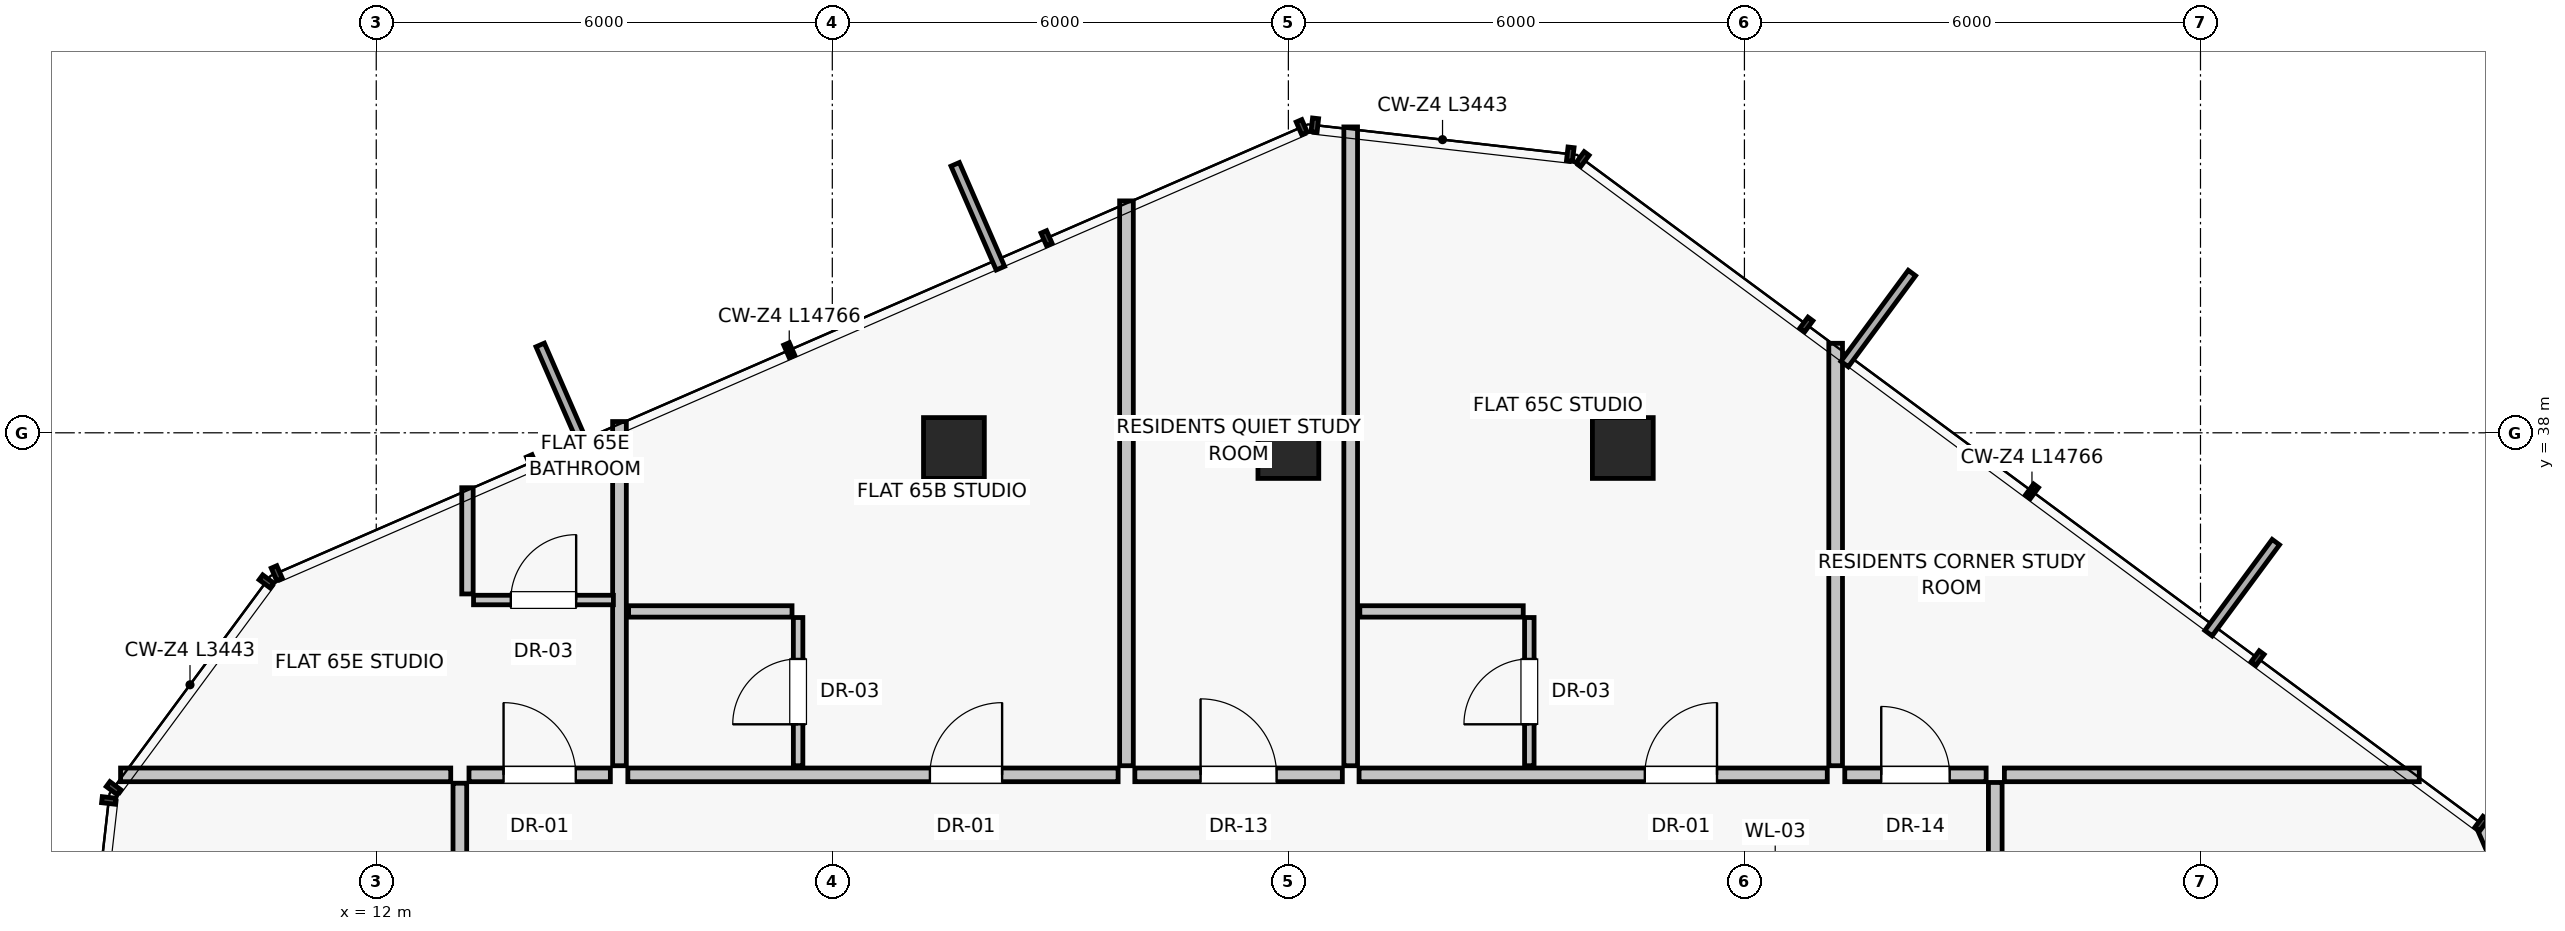
"""IFC4 building model, lengths in metres.
Left out: names, types, materials, properties, quantities, classifications, styles, units other than length and angle.
Written with IfcOpenShell. Run it as: python <this file> out.ifc"""

import sys

from ifc_helpers import new_model, si_unit, direction, frame, frame_2d, origin, origin_2d, place, context, subcontext, project, spatial, rectangle, extrude, source, transform, mapped, element, fill, save


model = new_model("IFC4")
c1 = context("Model", 3, precision=1e-05, world=origin(), true_north=direction((0.0, 1.0)))
c2 = subcontext(c1, "Body", "Model", "MODEL_VIEW")
j1 = project(units=[si_unit("LENGTHUNIT", "METRE"), si_unit("PLANEANGLEUNIT", "RADIAN")], contexts=[c1])
p1 = place(None, origin())
s1 = spatial("IfcSite", under=j1, at=p1, CompositionType="ELEMENT")
p2 = place(p1, origin())
s2 = spatial("IfcBuilding", under=s1, at=p2, CompositionType="ELEMENT")
p3 = place(p2, frame((0.0, 0.0, 230.05)))
s3 = spatial("IfcBuildingStorey", under=s2, at=p3, CompositionType="ELEMENT", Elevation=230.05)
for number, where, z_axis, x_axis in (
    (1, (28.4, 37.8, -0.235), (0.0, 0.0, 1.0), (1.0, 0.0, 0.0)),
    (2, (24.0, 37.8, -0.235), (0.0, 0.0, 1.0), (1.0, 0.0, 0.0)),
    (3, (19.6, 37.8, -0.235), (0.0, 0.0, 1.0), (1.0, 0.0, 0.0)),
):
    element("IfcColumn", number, at=place(p3, frame(where, z_axis=z_axis, x_axis=x_axis)), inside=s3, PredefinedType="COLUMN", context=c2, shape_type="SweptSolid", body=[
        extrude(rectangle(XDim=0.8, YDim=0.8, at=origin_2d()), origin(), (0.0, 0.0, 1.0), 3.485),
    ])
p4 = place(p3, frame((41.205, 29.502, 0.0), z_axis=(0.0, 0.0, 1.0), x_axis=(-0.399074107553, 0.916918675064, 0.0)))
e4 = element("IfcWall", 4, at=p4, inside=s3, PredefinedType="SOLIDWALL", context=c2, shape_type="SweptSolid", body=[
    extrude(rectangle(XDim=3.643, YDim=0.25, at=frame_2d((1.821, 0.0))), origin(), (0.0, 0.0, 1.0), 3.015),
])
p5 = place(p4, frame((0.46, 0.0, 0.0)))
e5 = element("IfcOpeningElement", 5, at=p5, cuts=e4, PredefinedType="OPENING", context=c2, shape_type="SweptSolid", body=[
    extrude(rectangle(XDim=1.15, YDim=2.25, at=frame_2d((0.575, 1.125))), frame((0.0, 0.135, 0.0), z_axis=(0.0, -1.0, 0.0), x_axis=(1.0, 0.0, 0.0)), (0.0, 0.0, 1.0), 0.27),
])
p6 = place(p3, frame((15.2, 33.62, 0.0), z_axis=(0.0, 0.0, 1.0), x_axis=(0.0, 1.0, 0.0)))
e6 = element("IfcWall", 6, at=p6, inside=s3, PredefinedType="PARTITIONING", context=c2, shape_type="SweptSolid", body=[
    extrude(rectangle(XDim=4.528, YDim=0.18, at=frame_2d((2.264, 0.0))), origin(), (0.0, 0.0, 1.0), 3.015),
])
p7 = place(p3, frame((31.2, 33.62, 0.0), z_axis=(0.0, 0.0, 1.0), x_axis=(0.0, 1.0, 0.0)))
e7 = element("IfcWall", 7, at=p7, inside=s3, PredefinedType="PARTITIONING", context=c2, shape_type="SweptSolid", body=[
    extrude(rectangle(XDim=5.558, YDim=0.18, at=frame_2d((2.779, 0.0))), origin(), (0.0, 0.0, 1.0), 3.015),
])
p8 = place(p3, frame((21.98, 33.5, 0.0), z_axis=(0.0, 0.0, 1.0), x_axis=(1.0, 0.0, 0.0)))
e8 = element("IfcWall", 8, at=p8, inside=s3, PredefinedType="PARTITIONING", context=c2, shape_type="SweptSolid", body=[
    extrude(rectangle(XDim=2.73, YDim=0.18, at=frame_2d((1.365, 0.0))), origin(), (0.0, 0.0, 1.0), 3.015),
])
p9 = place(p8, frame((0.865, 0.0, 0.0)))
e9 = element("IfcOpeningElement", 9, at=p9, cuts=e8, PredefinedType="OPENING", context=c2, shape_type="SweptSolid", body=[
    extrude(rectangle(XDim=1.0, YDim=2.01, at=frame_2d((0.5, 1.005))), frame((0.0, 0.1, 0.0), z_axis=(0.0, -1.0, 0.0), x_axis=(1.0, 0.0, 0.0)), (0.0, 0.0, 1.0), 0.2),
])
p10 = place(p3, frame((21.87, 33.62, 0.0), z_axis=(0.0, 0.0, 1.0), x_axis=(0.0, 1.0, 0.0)))
e10 = element("IfcWall", 10, at=p10, inside=s3, PredefinedType="PARTITIONING", context=c2, shape_type="SweptSolid", body=[
    extrude(rectangle(XDim=7.431, YDim=0.18, at=frame_2d((3.715, 0.0))), origin(), (0.0, 0.0, 1.0), 3.015),
])
p11 = place(p3, frame((15.31, 33.5, 0.0), z_axis=(0.0, 0.0, 1.0), x_axis=(1.0, 0.0, 0.0)))
e11 = element("IfcWall", 11, at=p11, inside=s3, PredefinedType="PARTITIONING", context=c2, shape_type="SweptSolid", body=[
    extrude(rectangle(XDim=6.45, YDim=0.18, at=frame_2d((3.225, 0.0))), origin(), (0.0, 0.0, 1.0), 3.015),
])
p12 = place(p11, frame((3.974, 0.0, 0.0)))
e12 = element("IfcOpeningElement", 12, at=p12, cuts=e11, PredefinedType="OPENING", context=c2, shape_type="SweptSolid", body=[
    extrude(rectangle(XDim=0.95, YDim=2.02, at=frame_2d((0.475, 1.01))), frame((0.0, 0.1, 0.0), z_axis=(0.0, -1.0, 0.0), x_axis=(1.0, 0.0, 0.0)), (0.0, 0.0, 1.0), 0.2),
])
p13 = place(p3, frame((17.55, 33.62, 0.0), z_axis=(0.0, 0.0, 1.0), x_axis=(0.0, 1.0, 0.0)))
e13 = element("IfcWall", 13, at=p13, inside=s3, PredefinedType="PARTITIONING", context=c2, shape_type="SweptSolid", body=[
    extrude(rectangle(XDim=1.95, YDim=0.125, at=frame_2d((0.975, 0.0))), origin(), (0.0, 0.0, 1.0), 3.015),
])
p14 = place(p13, frame((0.545, 0.0, 0.0)))
e14 = element("IfcOpeningElement", 14, at=p14, cuts=e13, PredefinedType="OPENING", context=c2, shape_type="SweptSolid", body=[
    extrude(rectangle(XDim=0.86, YDim=2.01, at=frame_2d((0.43, 1.005))), frame((0.0, 0.073, 0.0), z_axis=(0.0, -1.0, 0.0), x_axis=(1.0, 0.0, 0.0)), (0.0, 0.0, 1.0), 0.145),
])
p15 = place(p3, frame((15.32, 35.65, 0.0), z_axis=(0.0, 0.0, 1.0), x_axis=(1.0, 0.0, 0.0)))
e15 = element("IfcWall", 15, at=p15, inside=s3, PredefinedType="PARTITIONING", context=c2, shape_type="SweptSolid", body=[
    extrude(rectangle(XDim=2.15, YDim=0.15, at=frame_2d((1.075, 0.0))), origin(), (0.0, 0.0, 1.0), 3.015),
])
p16 = place(p3, frame((24.82, 33.62, 0.0), z_axis=(0.0, 0.0, 1.0), x_axis=(0.0, 1.0, 0.0)))
e16 = element("IfcWall", 16, at=p16, inside=s3, PredefinedType="PARTITIONING", context=c2, shape_type="SweptSolid", body=[
    extrude(rectangle(XDim=8.404, YDim=0.18, at=frame_2d((4.202, 0.0))), origin(), (0.0, 0.0, 1.0), 3.015),
])
p17 = place(p3, frame((24.93, 33.5, 0.0), z_axis=(0.0, 0.0, 1.0), x_axis=(1.0, 0.0, 0.0)))
e17 = element("IfcWall", 17, at=p17, inside=s3, PredefinedType="PARTITIONING", context=c2, shape_type="SweptSolid", body=[
    extrude(rectangle(XDim=6.16, YDim=0.18, at=frame_2d((3.08, 0.0))), origin(), (0.0, 0.0, 1.0), 3.015),
])
p18 = place(p17, frame((3.76, 0.0, 0.0)))
e18 = element("IfcOpeningElement", 18, at=p18, cuts=e17, PredefinedType="OPENING", context=c2, shape_type="SweptSolid", body=[
    extrude(rectangle(XDim=0.95, YDim=2.02, at=frame_2d((0.475, 1.01))), frame((0.0, 0.1, 0.0), z_axis=(0.0, -1.0, 0.0), x_axis=(1.0, 0.0, 0.0)), (0.0, 0.0, 1.0), 0.2),
])
p19 = place(p3, frame((27.17, 33.62, 0.0), z_axis=(0.0, 0.0, 1.0), x_axis=(0.0, 1.0, 0.0)))
e19 = element("IfcWall", 19, at=p19, inside=s3, PredefinedType="PARTITIONING", context=c2, shape_type="SweptSolid", body=[
    extrude(rectangle(XDim=1.95, YDim=0.125, at=frame_2d((0.975, 0.0))), origin(), (0.0, 0.0, 1.0), 3.015),
])
p20 = place(p19, frame((0.545, 0.0, 0.0)))
e20 = element("IfcOpeningElement", 20, at=p20, cuts=e19, PredefinedType="OPENING", context=c2, shape_type="SweptSolid", body=[
    extrude(rectangle(XDim=0.86, YDim=2.01, at=frame_2d((0.43, 1.005))), frame((0.0, 0.073, 0.0), z_axis=(0.0, -1.0, 0.0), x_axis=(1.0, 0.0, 0.0)), (0.0, 0.0, 1.0), 0.145),
])
p21 = place(p3, frame((24.94, 35.65, 0.0), z_axis=(0.0, 0.0, 1.0), x_axis=(1.0, 0.0, 0.0)))
e21 = element("IfcWall", 21, at=p21, inside=s3, PredefinedType="PARTITIONING", context=c2, shape_type="SweptSolid", body=[
    extrude(rectangle(XDim=2.15, YDim=0.15, at=frame_2d((1.075, 0.0))), origin(), (0.0, 0.0, 1.0), 3.015),
])
p22 = place(p3, frame((12.98, 33.5, 0.0), z_axis=(0.0, 0.0, 1.0), x_axis=(-1.0, 0.0, 0.0)))
e22 = element("IfcWall", 22, at=p22, inside=s3, PredefinedType="PARTITIONING", context=c2, shape_type="SweptSolid", body=[
    extrude(rectangle(XDim=4.344, YDim=0.18, at=frame_2d((2.172, 0.0))), origin(), (0.0, 0.0, 1.0), 3.015),
])
p23 = place(p3, frame((13.1, 28.801, 0.0), z_axis=(0.0, 0.0, 1.0), x_axis=(0.0, 1.0, 0.0)))
e23 = element("IfcWall", 23, at=p23, inside=s3, PredefinedType="PARTITIONING", context=c2, shape_type="SweptSolid", body=[
    extrude(rectangle(XDim=4.589, YDim=0.18, at=frame_2d((2.294, 0.0))), origin(), (0.0, 0.0, 1.0), 2.662),
])
p24 = place(p23, frame((1.794, 0.0, 0.0)))
e24 = element("IfcOpeningElement", 24, at=p24, cuts=e23, PredefinedType="OPENING", context=c2, shape_type="SweptSolid", body=[
    extrude(rectangle(XDim=1.0, YDim=2.01, at=frame_2d((0.5, 1.005))), frame((0.0, 0.1, 0.0), z_axis=(0.0, -1.0, 0.0), x_axis=(1.0, 0.0, 0.0)), (0.0, 0.0, 1.0), 0.2),
])
p25 = place(p3, frame((33.3, 31.5, 0.0), z_axis=(0.0, 0.0, 1.0), x_axis=(0.0, 1.0, 0.0)))
e25 = element("IfcWall", 25, at=p25, inside=s3, PredefinedType="PARTITIONING", context=c2, shape_type="SweptSolid", body=[
    extrude(rectangle(XDim=1.9, YDim=0.18, at=frame_2d((0.95, 0.0))), origin(), (0.0, 0.0, 1.0), 3.015),
])
p26 = place(p3, frame((13.22, 33.5, 0.0), z_axis=(0.0, 0.0, 1.0), x_axis=(1.0, 0.0, 0.0)))
e26 = element("IfcWall", 26, at=p26, inside=s3, PredefinedType="PARTITIONING", context=c2, shape_type="SweptSolid", body=[
    extrude(rectangle(XDim=1.86, YDim=0.18, at=frame_2d((0.93, 0.0))), origin(), (0.0, 0.0, 1.0), 3.015),
])
p27 = place(p26, frame((0.455, 0.0, 0.0)))
e27 = element("IfcOpeningElement", 27, at=p27, cuts=e26, PredefinedType="OPENING", context=c2, shape_type="SweptSolid", body=[
    extrude(rectangle(XDim=0.95, YDim=2.02, at=frame_2d((0.475, 1.01))), frame((0.0, 0.1, 0.0), z_axis=(0.0, -1.0, 0.0), x_axis=(1.0, 0.0, 0.0)), (0.0, 0.0, 1.0), 0.2),
])
p28 = place(p3, frame((13.28, 35.8, 0.0), z_axis=(0.0, 0.0, 1.0), x_axis=(1.0, 0.0, 0.0)))
e28 = element("IfcWall", 28, at=p28, inside=s3, PredefinedType="PARTITIONING", context=c2, shape_type="SweptSolid", body=[
    extrude(rectangle(XDim=1.84, YDim=0.125, at=frame_2d((0.92, 0.0))), origin(), (0.0, 0.0, 1.0), 3.015),
])
p29 = place(p28, frame((0.49, 0.0, 0.0)))
e29 = element("IfcOpeningElement", 29, at=p29, cuts=e28, PredefinedType="OPENING", context=c2, shape_type="SweptSolid", body=[
    extrude(rectangle(XDim=0.86, YDim=2.01, at=frame_2d((0.43, 1.005))), frame((0.0, 0.073, 0.0), z_axis=(0.0, -1.0, 0.0), x_axis=(1.0, 0.0, 0.0)), (0.0, 0.0, 1.0), 0.145),
])
p30 = place(p3, frame((13.2, 35.88, 0.0), z_axis=(0.0, 0.0, 1.0), x_axis=(0.0, 1.0, 0.0)))
e30 = element("IfcWall", 30, at=p30, inside=s3, PredefinedType="PARTITIONING", context=c2, shape_type="SweptSolid", body=[
    extrude(rectangle(XDim=1.398, YDim=0.15, at=frame_2d((0.699, 0.0))), origin(), (0.0, 0.0, 1.0), 3.015),
])
p31 = place(p3, frame((33.42, 33.5, 0.0), z_axis=(0.0, 0.0, 1.0), x_axis=(1.0, 0.0, 0.0)))
e31 = element("IfcWall", 31, at=p31, inside=s3, PredefinedType="PARTITIONING", context=c2, shape_type="SweptSolid", body=[
    extrude(rectangle(XDim=5.458, YDim=0.18, at=frame_2d((2.729, 0.0))), origin(), (0.0, 0.0, 1.0), 3.015),
])
p32 = place(p3, frame((31.32, 33.5, 0.0), z_axis=(0.0, 0.0, 1.0), x_axis=(1.0, 0.0, 0.0)))
e32 = element("IfcWall", 32, at=p32, inside=s3, PredefinedType="PARTITIONING", context=c2, shape_type="SweptSolid", body=[
    extrude(rectangle(XDim=1.86, YDim=0.18, at=frame_2d((0.93, 0.0))), origin(), (0.0, 0.0, 1.0), 3.015),
])
p33 = place(p32, frame((0.48, 0.0, 0.0)))
e33 = element("IfcOpeningElement", 33, at=p33, cuts=e32, PredefinedType="OPENING", context=c2, shape_type="SweptSolid", body=[
    extrude(rectangle(XDim=0.9, YDim=2.01, at=frame_2d((0.45, 1.005))), frame((0.0, 0.1, 0.0), z_axis=(0.0, -1.0, 0.0), x_axis=(1.0, 0.0, 0.0)), (0.0, 0.0, 1.0), 0.2),
])
m1 = source(origin(), c2, "Body", "SweptSolid", [
    extrude(rectangle(XDim=1.0, YDim=2.01, at=frame_2d((0.5, 1.005))), frame((0.0, 0.025, 0.0), z_axis=(0.0, -1.0, 0.0), x_axis=(1.0, 0.0, 0.0)), (0.0, 0.0, 1.0), 0.05),
])
p34 = place(p9, origin())
e34 = element("IfcDoor", 34, at=p34, inside=s3, OperationType="SINGLE_SWING_LEFT", PredefinedType="DOOR", context=c2, shape_type="MappedRepresentation", body=[
    mapped(m1, transform((0.0, 0.0, 0.0), scale=1.0)),
])
fill(e9, e34)
m2 = source(origin(), c2, "Body", "SweptSolid", [
    extrude(rectangle(XDim=0.95, YDim=2.02, at=frame_2d((0.475, 1.01))), frame((0.0, 0.025, 0.0), z_axis=(0.0, -1.0, 0.0), x_axis=(1.0, 0.0, 0.0)), (0.0, 0.0, 1.0), 0.05),
])
p35 = place(p12, origin())
e35 = element("IfcDoor", 35, at=p35, inside=s3, OperationType="SINGLE_SWING_RIGHT", PredefinedType="DOOR", context=c2, shape_type="MappedRepresentation", body=[
    mapped(m2, transform((0.0, 0.0, 0.0), scale=1.0)),
])
fill(e12, e35)
m3 = source(origin(), c2, "Body", "SweptSolid", [
    extrude(rectangle(XDim=0.86, YDim=2.01, at=frame_2d((0.43, 1.005))), frame((0.0, 0.025, 0.0), z_axis=(0.0, -1.0, 0.0), x_axis=(1.0, 0.0, 0.0)), (0.0, 0.0, 1.0), 0.05),
])
p36 = place(p14, origin())
e36 = element("IfcDoor", 36, at=p36, inside=s3, OperationType="SINGLE_SWING_LEFT", PredefinedType="DOOR", context=c2, shape_type="MappedRepresentation", body=[
    mapped(m3, transform((0.0, 0.0, 0.0), scale=1.0)),
])
fill(e14, e36)
p37 = place(p18, origin())
e37 = element("IfcDoor", 37, at=p37, inside=s3, OperationType="SINGLE_SWING_RIGHT", PredefinedType="DOOR", context=c2, shape_type="MappedRepresentation", body=[
    mapped(m2, transform((0.0, 0.0, 0.0), scale=1.0)),
])
fill(e18, e37)
p38 = place(p20, origin())
e38 = element("IfcDoor", 38, at=p38, inside=s3, OperationType="SINGLE_SWING_LEFT", PredefinedType="DOOR", context=c2, shape_type="MappedRepresentation", body=[
    mapped(m3, transform((0.0, 0.0, 0.0), scale=1.0)),
])
fill(e20, e38)
p39 = place(p27, origin())
e39 = element("IfcDoor", 39, at=p39, inside=s3, OperationType="SINGLE_SWING_LEFT", PredefinedType="DOOR", context=c2, shape_type="MappedRepresentation", body=[
    mapped(m2, transform((0.0, 0.0, 0.0), scale=1.0)),
])
fill(e27, e39)
p40 = place(p29, origin())
e40 = element("IfcDoor", 40, at=p40, inside=s3, OperationType="SINGLE_SWING_RIGHT", PredefinedType="DOOR", context=c2, shape_type="MappedRepresentation", body=[
    mapped(m3, transform((0.0, 0.0, 0.0), scale=1.0)),
])
fill(e29, e40)
m4 = source(origin(), c2, "Body", "SweptSolid", [
    extrude(rectangle(XDim=0.9, YDim=2.01, at=frame_2d((0.45, 1.005))), frame((0.0, 0.025, 0.0), z_axis=(0.0, -1.0, 0.0), x_axis=(1.0, 0.0, 0.0)), (0.0, 0.0, 1.0), 0.05),
])
p41 = place(p33, origin())
e41 = element("IfcDoor", 41, at=p41, inside=s3, OperationType="SINGLE_SWING_LEFT", PredefinedType="DOOR", context=c2, shape_type="MappedRepresentation", body=[
    mapped(m4, transform((0.0, 0.0, 0.0), scale=1.0)),
])
fill(e33, e41)
save(model, sys.argv[1])
